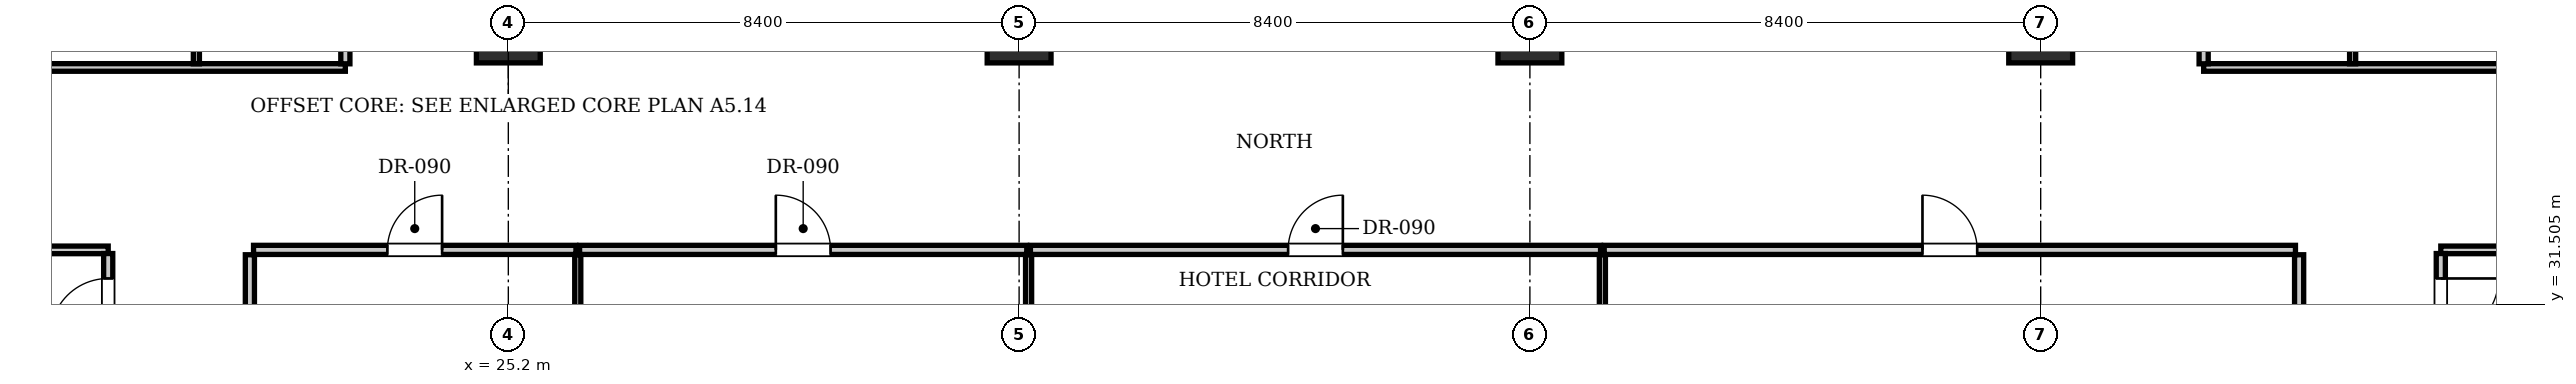
"""IFC4 building model, lengths in metres.
Left out: names, types, materials, properties, quantities, classifications, styles, units other than length and angle.
Written with IfcOpenShell. Run it as: python <this file> out.ifc"""

import sys

from ifc_helpers import new_model, si_unit, direction, frame, frame_2d, origin, origin_2d, place, context, subcontext, project, spatial, rectangle, extrude, element, fill, save


model = new_model("IFC4")
c1 = context("Model", 3, precision=1e-05, world=origin(), true_north=direction((0.0, 1.0)))
c2 = subcontext(c1, "Body", "Model", "MODEL_VIEW")
j1 = project(units=[si_unit("LENGTHUNIT", "METRE"), si_unit("PLANEANGLEUNIT", "RADIAN")], contexts=[c1])
p1 = place(None, origin())
s1 = spatial("IfcSite", under=j1, at=p1, CompositionType="ELEMENT")
p2 = place(p1, origin())
s2 = spatial("IfcBuilding", under=s1, at=p2, CompositionType="ELEMENT")
p3 = place(p2, frame((0.0, 0.0, 103.95)))
s3 = spatial("IfcBuildingStorey", under=s2, at=p3, CompositionType="ELEMENT", Elevation=103.95)
for number, where, z_axis, x_axis in (
    (1, (25.2, 36.0, 0.0), (0.0, 0.0, 1.0), (1.0, 0.0, 0.0)),
    (2, (33.6, 36.0, 0.0), (0.0, 0.0, 1.0), (1.0, 0.0, 0.0)),
    (3, (42.0, 36.0, 0.0), (0.0, 0.0, 1.0), (1.0, 0.0, 0.0)),
    (4, (50.4, 36.0, 0.0), (0.0, 0.0, 1.0), (1.0, 0.0, 0.0)),
):
    element("IfcColumn", number, at=place(p3, frame(where, z_axis=z_axis, x_axis=x_axis)), inside=s3, PredefinedType="COLUMN", context=c2, shape_type="SweptSolid", body=[
        extrude(rectangle(XDim=1.05, YDim=1.05, at=origin_2d()), origin(), (0.0, 0.0, 1.0), 3.85),
    ])
for number, where, z_axis, x_axis in (
    (5, (20.95, 24.98, 0.0), (0.0, 0.0, 1.0), (0.0, 1.0, 0.0)),
    (6, (54.65, 24.98, 0.0), (0.0, 0.0, 1.0), (0.0, 1.0, 0.0)),
):
    element("IfcWall", number, at=place(p3, frame(where, z_axis=z_axis, x_axis=x_axis)), inside=s3, PredefinedType="PARTITIONING", context=c2, shape_type="SweptSolid", body=[
        extrude(rectangle(XDim=7.34, YDim=0.15, at=frame_2d((3.67, 0.0))), origin(), (0.0, 0.0, 1.0), 3.293),
    ])
p4 = place(p3, frame((21.01, 32.4, 0.0), z_axis=(0.0, 0.0, 1.0), x_axis=(1.0, 0.0, 0.0)))
e7 = element("IfcWall", 7, at=p4, inside=s3, PredefinedType="PARTITIONING", context=c2, shape_type="SweptSolid", body=[
    extrude(rectangle(XDim=5.302, YDim=0.15, at=frame_2d((2.651, 0.0))), origin(), (0.0, 0.0, 1.0), 3.61),
])
p5 = place(p4, frame((2.201, 0.0, 0.0)))
e8 = element("IfcOpeningElement", 8, at=p5, cuts=e7, PredefinedType="OPENING", context=c2, shape_type="SweptSolid", body=[
    extrude(rectangle(XDim=0.9, YDim=2.1, at=frame_2d((0.45, 1.05))), frame((0.0, 0.085, 0.0), z_axis=(0.0, -1.0, 0.0), x_axis=(1.0, 0.0, 0.0)), (0.0, 0.0, 1.0), 0.17),
])
p6 = place(p3, frame((26.342, 24.98, 0.0), z_axis=(0.0, 0.0, 1.0), x_axis=(0.0, 1.0, 0.0)))
e9 = element("IfcWall", 9, at=p6, inside=s3, PredefinedType="PARTITIONING", context=c2, shape_type="SweptSolid", body=[
    extrude(rectangle(XDim=7.34, YDim=0.1, at=frame_2d((3.67, 0.0))), origin(), (0.0, 0.0, 1.0), 3.61),
])
p7 = place(p3, frame((26.372, 32.4, 0.0), z_axis=(0.0, 0.0, 1.0), x_axis=(1.0, 0.0, 0.0)))
e10 = element("IfcWall", 10, at=p7, inside=s3, PredefinedType="PARTITIONING", context=c2, shape_type="SweptSolid", body=[
    extrude(rectangle(XDim=7.354, YDim=0.15, at=frame_2d((3.677, 0.0))), origin(), (0.0, 0.0, 1.0), 3.61),
])
p8 = place(p7, frame((3.227, 0.0, 0.0)))
e11 = element("IfcOpeningElement", 11, at=p8, cuts=e10, PredefinedType="OPENING", context=c2, shape_type="SweptSolid", body=[
    extrude(rectangle(XDim=0.9, YDim=2.1, at=frame_2d((0.45, 1.05))), frame((0.0, 0.085, 0.0), z_axis=(0.0, -1.0, 0.0), x_axis=(1.0, 0.0, 0.0)), (0.0, 0.0, 1.0), 0.17),
])
p9 = place(p3, frame((33.756, 24.98, 0.0), z_axis=(0.0, 0.0, 1.0), x_axis=(0.0, 1.0, 0.0)))
e12 = element("IfcWall", 12, at=p9, inside=s3, PredefinedType="PARTITIONING", context=c2, shape_type="SweptSolid", body=[
    extrude(rectangle(XDim=7.34, YDim=0.1, at=frame_2d((3.67, 0.0))), origin(), (0.0, 0.0, 1.0), 2.999),
])
p10 = place(p3, frame((33.786, 32.4, 0.0), z_axis=(0.0, 0.0, 1.0), x_axis=(1.0, 0.0, 0.0)))
e13 = element("IfcWall", 13, at=p10, inside=s3, PredefinedType="PARTITIONING", context=c2, shape_type="SweptSolid", body=[
    extrude(rectangle(XDim=9.376, YDim=0.15, at=frame_2d((4.688, 0.0))), origin(), (0.0, 0.0, 1.0), 3.61),
])
p11 = place(p10, frame((4.238, 0.0, 0.0)))
e14 = element("IfcOpeningElement", 14, at=p11, cuts=e13, PredefinedType="OPENING", context=c2, shape_type="SweptSolid", body=[
    extrude(rectangle(XDim=0.9, YDim=2.1, at=frame_2d((0.45, 1.05))), frame((0.0, 0.085, 0.0), z_axis=(0.0, -1.0, 0.0), x_axis=(1.0, 0.0, 0.0)), (0.0, 0.0, 1.0), 0.17),
])
p12 = place(p3, frame((43.192, 24.98, 0.0), z_axis=(0.0, 0.0, 1.0), x_axis=(0.0, 1.0, 0.0)))
e15 = element("IfcWall", 15, at=p12, inside=s3, PredefinedType="PARTITIONING", context=c2, shape_type="SweptSolid", body=[
    extrude(rectangle(XDim=7.34, YDim=0.1, at=frame_2d((3.67, 0.0))), origin(), (0.0, 0.0, 1.0), 3.61),
])
p13 = place(p3, frame((43.222, 32.4, 0.0), z_axis=(0.0, 0.0, 1.0), x_axis=(1.0, 0.0, 0.0)))
e16 = element("IfcWall", 16, at=p13, inside=s3, PredefinedType="PARTITIONING", context=c2, shape_type="SweptSolid", body=[
    extrude(rectangle(XDim=11.368, YDim=0.15, at=frame_2d((5.684, 0.0))), origin(), (0.0, 0.0, 1.0), 3.61),
])
p14 = place(p13, frame((5.234, 0.0, 0.0)))
e17 = element("IfcOpeningElement", 17, at=p14, cuts=e16, PredefinedType="OPENING", context=c2, shape_type="SweptSolid", body=[
    extrude(rectangle(XDim=0.9, YDim=2.1, at=frame_2d((0.45, 1.05))), frame((0.0, 0.085, 0.0), z_axis=(0.0, -1.0, 0.0), x_axis=(1.0, 0.0, 0.0)), (0.0, 0.0, 1.0), 0.17),
])
p15 = place(p3, frame((10.9, 32.4, 0.0), z_axis=(0.0, 0.0, 1.0), x_axis=(1.0, 0.0, 0.0)))
e18 = element("IfcWall", 18, at=p15, inside=s3, PredefinedType="PARTITIONING", context=c2, shape_type="SweptSolid", body=[
    extrude(rectangle(XDim=7.72, YDim=0.125, at=frame_2d((3.86, 0.0))), origin(), (0.0, 0.0, 1.0), 3.61),
])
p16 = place(p3, frame((56.98, 32.4, 0.0), z_axis=(0.0, 0.0, 1.0), x_axis=(1.0, 0.0, 0.0)))
e19 = element("IfcWall", 19, at=p16, inside=s3, PredefinedType="PARTITIONING", context=c2, shape_type="SweptSolid", body=[
    extrude(rectangle(XDim=7.72, YDim=0.125, at=frame_2d((3.86, 0.0))), origin(), (0.0, 0.0, 1.0), 3.61),
])
p17 = place(p3, frame((18.62, 30.57, 0.0), z_axis=(0.0, 0.0, 1.0), x_axis=(0.0, 1.0, 0.0)))
e20 = element("IfcWall", 20, at=p17, inside=s3, PredefinedType="PARTITIONING", context=c2, shape_type="SweptSolid", body=[
    extrude(rectangle(XDim=1.77, YDim=0.15, at=frame_2d((0.885, 0.0))), origin(), (0.0, 0.0, 1.0), 3.61),
])
p18 = place(p17, frame((0.41, 0.0, 0.0)))
e21 = element("IfcOpeningElement", 21, at=p18, cuts=e20, PredefinedType="OPENING", context=c2, shape_type="SweptSolid", body=[
    extrude(rectangle(XDim=0.95, YDim=2.15, at=frame_2d((0.475, 1.075))), frame((0.0, 0.085, 0.0), z_axis=(0.0, -1.0, 0.0), x_axis=(1.0, 0.0, 0.0)), (0.0, 0.0, 1.0), 0.17),
])
p19 = place(p3, frame((56.98, 30.57, 0.0), z_axis=(0.0, 0.0, 1.0), x_axis=(0.0, 1.0, 0.0)))
e22 = element("IfcWall", 22, at=p19, inside=s3, PredefinedType="PARTITIONING", context=c2, shape_type="SweptSolid", body=[
    extrude(rectangle(XDim=1.77, YDim=0.15, at=frame_2d((0.885, 0.0))), origin(), (0.0, 0.0, 1.0), 3.61),
])
p20 = place(p19, frame((0.41, 0.0, 0.0)))
e23 = element("IfcOpeningElement", 23, at=p20, cuts=e22, PredefinedType="OPENING", context=c2, shape_type="SweptSolid", body=[
    extrude(rectangle(XDim=0.95, YDim=2.15, at=frame_2d((0.475, 1.075))), frame((0.0, 0.085, 0.0), z_axis=(0.0, -1.0, 0.0), x_axis=(1.0, 0.0, 0.0)), (0.0, 0.0, 1.0), 0.17),
])
p21 = place(p3, frame((10.9, 35.4, 0.0), z_axis=(0.0, 0.0, 1.0), x_axis=(1.0, 0.0, 0.0)))
e24 = element("IfcWall", 24, at=p21, inside=s3, PredefinedType="PARTITIONING", context=c2, shape_type="SweptSolid", body=[
    extrude(rectangle(XDim=11.62, YDim=0.125, at=frame_2d((5.81, 0.0))), origin(), (0.0, 0.0, 1.0), 3.61),
])
p22 = place(p3, frame((53.08, 35.4, 0.0), z_axis=(0.0, 0.0, 1.0), x_axis=(1.0, 0.0, 0.0)))
e25 = element("IfcWall", 25, at=p22, inside=s3, PredefinedType="PARTITIONING", context=c2, shape_type="SweptSolid", body=[
    extrude(rectangle(XDim=11.62, YDim=0.125, at=frame_2d((5.81, 0.0))), origin(), (0.0, 0.0, 1.0), 3.61),
])
p23 = place(p3, frame((22.52, 35.46, 0.0), z_axis=(0.0, 0.0, 1.0), x_axis=(0.0, 1.0, 0.0)))
e26 = element("IfcWall", 26, at=p23, inside=s3, PredefinedType="PARTITIONING", context=c2, shape_type="SweptSolid", body=[
    extrude(rectangle(XDim=2.29, YDim=0.15, at=frame_2d((1.145, 0.0))), origin(), (0.0, 0.0, 1.0), 3.61),
])
p24 = place(p3, frame((20.07, 35.46, 0.0), z_axis=(0.0, 0.0, 1.0), x_axis=(0.0, 1.0, 0.0)))
e27 = element("IfcWall", 27, at=p24, inside=s3, PredefinedType="PARTITIONING", context=c2, shape_type="SweptSolid", body=[
    extrude(rectangle(XDim=2.29, YDim=0.1, at=frame_2d((1.145, 0.0))), origin(), (0.0, 0.0, 1.0), 3.61),
])
p25 = place(p3, frame((53.08, 35.46, 0.0), z_axis=(0.0, 0.0, 1.0), x_axis=(0.0, 1.0, 0.0)))
e28 = element("IfcWall", 28, at=p25, inside=s3, PredefinedType="PARTITIONING", context=c2, shape_type="SweptSolid", body=[
    extrude(rectangle(XDim=2.29, YDim=0.15, at=frame_2d((1.145, 0.0))), origin(), (0.0, 0.0, 1.0), 3.61),
])
p26 = place(p3, frame((55.53, 35.46, 0.0), z_axis=(0.0, 0.0, 1.0), x_axis=(0.0, 1.0, 0.0)))
e29 = element("IfcWall", 29, at=p26, inside=s3, PredefinedType="PARTITIONING", context=c2, shape_type="SweptSolid", body=[
    extrude(rectangle(XDim=2.29, YDim=0.1, at=frame_2d((1.145, 0.0))), origin(), (0.0, 0.0, 1.0), 3.61),
])
p27 = place(p5, origin())
e30 = element("IfcDoor", 30, at=p27, inside=s3, OperationType="SINGLE_SWING_RIGHT", PredefinedType="DOOR", context=c2, shape_type="SweptSolid", body=[
    extrude(rectangle(XDim=0.9, YDim=2.1, at=frame_2d((0.45, 1.05))), frame((0.0, 0.025, 0.0), z_axis=(0.0, -1.0, 0.0), x_axis=(1.0, 0.0, 0.0)), (0.0, 0.0, 1.0), 0.05),
])
fill(e8, e30)
p28 = place(p8, origin())
e31 = element("IfcDoor", 31, at=p28, inside=s3, OperationType="SINGLE_SWING_LEFT", PredefinedType="DOOR", context=c2, shape_type="SweptSolid", body=[
    extrude(rectangle(XDim=0.9, YDim=2.1, at=frame_2d((0.45, 1.05))), frame((0.0, 0.025, 0.0), z_axis=(0.0, -1.0, 0.0), x_axis=(1.0, 0.0, 0.0)), (0.0, 0.0, 1.0), 0.05),
])
fill(e11, e31)
p29 = place(p11, origin())
e32 = element("IfcDoor", 32, at=p29, inside=s3, OperationType="SINGLE_SWING_RIGHT", PredefinedType="DOOR", context=c2, shape_type="SweptSolid", body=[
    extrude(rectangle(XDim=0.9, YDim=2.1, at=frame_2d((0.45, 1.05))), frame((0.0, 0.025, 0.0), z_axis=(0.0, -1.0, 0.0), x_axis=(1.0, 0.0, 0.0)), (0.0, 0.0, 1.0), 0.05),
])
fill(e14, e32)
p30 = place(p14, origin())
e33 = element("IfcDoor", 33, at=p30, inside=s3, OperationType="SINGLE_SWING_LEFT", PredefinedType="DOOR", context=c2, shape_type="SweptSolid", body=[
    extrude(rectangle(XDim=0.9, YDim=2.1, at=frame_2d((0.45, 1.05))), frame((0.0, 0.025, 0.0), z_axis=(0.0, -1.0, 0.0), x_axis=(1.0, 0.0, 0.0)), (0.0, 0.0, 1.0), 0.05),
])
fill(e17, e33)
p31 = place(p18, origin())
e34 = element("IfcDoor", 34, at=p31, inside=s3, OperationType="SINGLE_SWING_LEFT", PredefinedType="DOOR", context=c2, shape_type="SweptSolid", body=[
    extrude(rectangle(XDim=0.95, YDim=2.15, at=frame_2d((0.475, 1.075))), frame((0.0, 0.025, 0.0), z_axis=(0.0, -1.0, 0.0), x_axis=(1.0, 0.0, 0.0)), (0.0, 0.0, 1.0), 0.05),
])
fill(e21, e34)
p32 = place(p20, frame((0.95, 0.0, 0.0), z_axis=(0.0, 0.0, 1.0), x_axis=(-1.0, 0.0, 0.0)))
e35 = element("IfcDoor", 35, at=p32, inside=s3, OperationType="SINGLE_SWING_LEFT", PredefinedType="DOOR", context=c2, shape_type="SweptSolid", body=[
    extrude(rectangle(XDim=0.95, YDim=2.15, at=frame_2d((0.475, 1.075))), frame((0.0, 0.025, 0.0), z_axis=(0.0, -1.0, 0.0), x_axis=(1.0, 0.0, 0.0)), (0.0, 0.0, 1.0), 0.05),
])
fill(e23, e35)
save(model, sys.argv[1])
